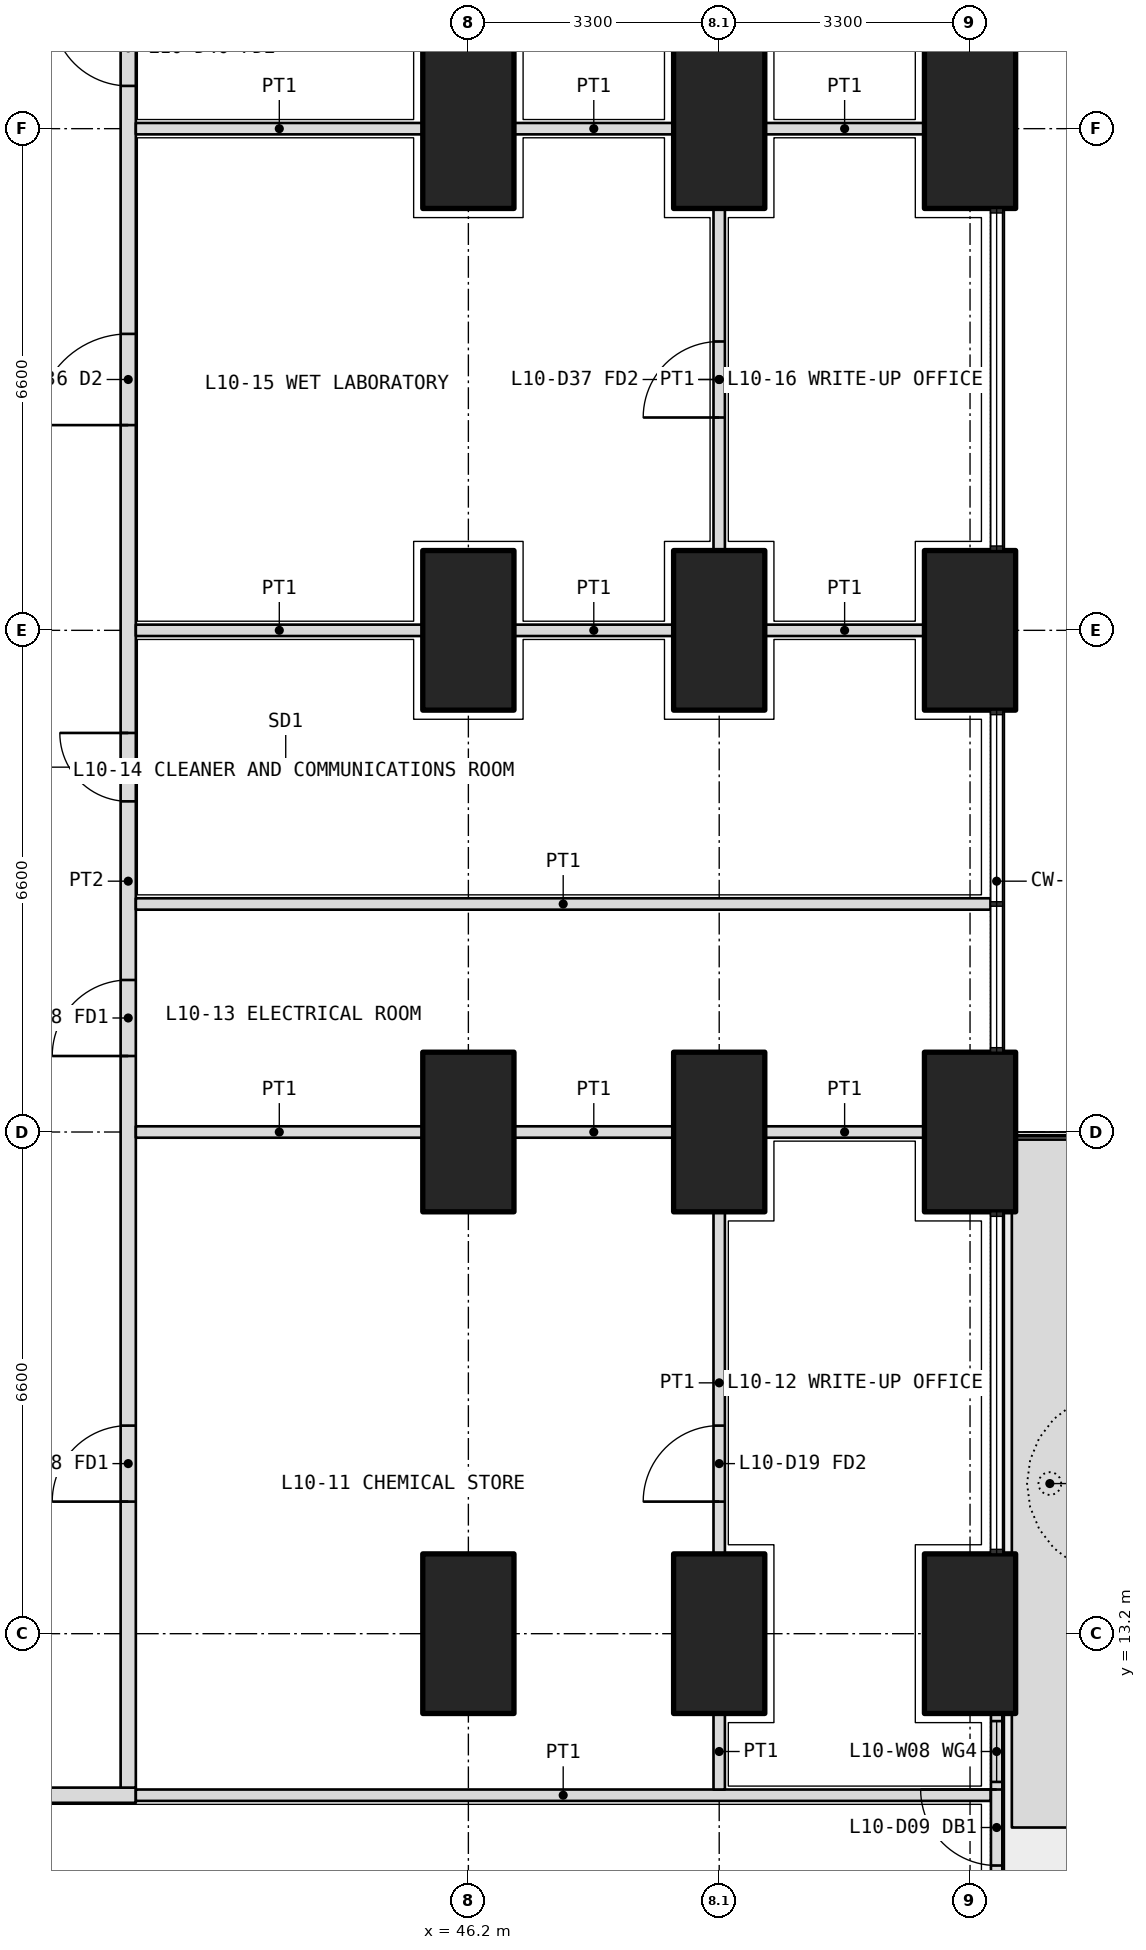
"""IFC4 building model, lengths in metres.
Left out: names, types, materials, properties, quantities, classifications, styles, units other than length and angle.
Written with IfcOpenShell. Run it as: python <this file> out.ifc"""

import sys

from ifc_helpers import new_model, si_unit, direction, frame, frame_2d, origin, origin_2d, place, context, subcontext, project, spatial, polyline, rectangle, outline, extrude, element, fill, save


model = new_model("IFC4")
c1 = context("Model", 3, precision=1e-05, world=origin(), true_north=direction((0.0, 1.0)))
c2 = subcontext(c1, "Body", "Model", "MODEL_VIEW")
j1 = project(units=[si_unit("LENGTHUNIT", "METRE"), si_unit("PLANEANGLEUNIT", "RADIAN")], contexts=[c1])
p1 = place(None, origin())
s1 = spatial("IfcSite", under=j1, at=p1, CompositionType="ELEMENT")
p2 = place(p1, origin())
s2 = spatial("IfcBuilding", under=s1, at=p2, CompositionType="ELEMENT")
p3 = place(p2, frame((0.0, 0.0, 46.5)))
s3 = spatial("IfcBuildingStorey", under=s2, at=p3, CompositionType="ELEMENT", Elevation=46.5)
for number, where, z_axis, x_axis in (
    (1, (52.8, 13.2, 0.0), (0.0, 0.0, 1.0), (0.0, 1.0, 0.0)),
    (2, (52.8, 19.8, 0.0), (0.0, 0.0, 1.0), (0.0, 1.0, 0.0)),
    (3, (52.8, 26.4, 0.0), (0.0, 0.0, 1.0), (0.0, 1.0, 0.0)),
    (4, (52.8, 33.0, 0.0), (0.0, 0.0, 1.0), (0.0, 1.0, 0.0)),
    (5, (49.5, 13.2, 0.0), (0.0, 0.0, 1.0), (0.0, 1.0, 0.0)),
    (6, (49.5, 19.8, 0.0), (0.0, 0.0, 1.0), (0.0, 1.0, 0.0)),
    (7, (49.5, 26.4, 0.0), (0.0, 0.0, 1.0), (0.0, 1.0, 0.0)),
    (8, (49.5, 33.0, 0.0), (0.0, 0.0, 1.0), (0.0, 1.0, 0.0)),
    (9, (46.2, 13.2, 0.0), (0.0, 0.0, 1.0), (0.0, 1.0, 0.0)),
    (10, (46.2, 19.8, 0.0), (0.0, 0.0, 1.0), (0.0, 1.0, 0.0)),
    (11, (46.2, 26.4, 0.0), (0.0, 0.0, 1.0), (0.0, 1.0, 0.0)),
    (12, (46.2, 33.0, 0.0), (0.0, 0.0, 1.0), (0.0, 1.0, 0.0)),
):
    element("IfcColumn", number, at=place(p3, frame(where, z_axis=z_axis, x_axis=x_axis)), inside=s3, PredefinedType="COLUMN", context=c2, shape_type="SweptSolid", body=[
        extrude(rectangle(XDim=2.1, YDim=1.2, at=origin_2d()), origin(), (0.0, 0.0, 1.0), 4.2),
    ])
p4 = place(p3, origin())
e13 = element("IfcWall", 13, at=p4, inside=s3, PredefinedType="USERDEFINED", context=c2, shape_type="SweptSolid", body=[
    extrude(outline(polyline([(53.35, 10.65), (54.35, 10.65), (54.35, 19.7), (53.35, 19.7), (53.35, 10.65)]), holes=[polyline([(53.5, 10.8), (54.2, 10.8), (54.2, 19.55), (53.5, 19.55), (53.5, 10.8)])]), origin(), (0.0, 0.0, 1.0), 1.05),
])
p5 = place(p3, frame((53.15, 7.65, 0.0), z_axis=(0.0, 0.0, 1.0), x_axis=(0.0, 1.0, 0.0)))
e14 = element("IfcWall", 14, at=p5, inside=s3, PredefinedType="SOLIDWALL", context=c2, shape_type="SweptSolid", body=[
    extrude(rectangle(XDim=4.5, YDim=0.15, at=frame_2d((2.25, 0.0))), origin(), (0.0, 0.0, 1.0), 2.7),
])
p6 = place(p5, frame((2.5, 0.0, 0.0)))
e15 = element("IfcOpeningElement", 15, at=p6, cuts=e14, PredefinedType="OPENING", context=c2, shape_type="SweptSolid", body=[
    extrude(rectangle(XDim=1.0, YDim=2.4, at=frame_2d((0.5, 1.2))), frame((0.0, 0.085, 0.0), z_axis=(0.0, -1.0, 0.0), x_axis=(1.0, 0.0, 0.0)), (0.0, 0.0, 1.0), 0.17),
])
p7 = place(p5, frame((0.1, 0.0, 0.1)))
e16 = element("IfcOpeningElement", 16, at=p7, cuts=e14, PredefinedType="OPENING", context=c2, shape_type="SweptSolid", body=[
    extrude(rectangle(XDim=1.9, YDim=2.3, at=frame_2d((0.95, 1.15))), frame((0.0, 0.085, 0.0), z_axis=(0.0, -1.0, 0.0), x_axis=(1.0, 0.0, 0.0)), (0.0, 0.0, 1.0), 0.17),
])
p8 = place(p5, frame((3.6, 0.0, 0.1)))
e17 = element("IfcOpeningElement", 17, at=p8, cuts=e14, PredefinedType="OPENING", context=c2, shape_type="SweptSolid", body=[
    extrude(rectangle(XDim=0.8, YDim=2.3, at=frame_2d((0.4, 1.15))), frame((0.0, 0.085, 0.0), z_axis=(0.0, -1.0, 0.0), x_axis=(1.0, 0.0, 0.0)), (0.0, 0.0, 1.0), 0.17),
])
p9 = place(p3, frame((10.975, 11.075, 0.0), z_axis=(0.0, 0.0, 1.0), x_axis=(1.0, 0.0, 0.0)))
e18 = element("IfcWall", 18, at=p9, inside=s3, PredefinedType="PARTITIONING", context=c2, shape_type="SweptSolid", body=[
    extrude(rectangle(XDim=30.85, YDim=0.2, at=frame_2d((15.425, 0.0))), origin(), (0.0, 0.0, 1.0), 2.85),
])
p10 = place(p9, frame((2.312, 0.0, 0.0)))
e19 = element("IfcOpeningElement", 19, at=p10, cuts=e18, PredefinedType="OPENING", context=c2, shape_type="SweptSolid", body=[
    extrude(rectangle(XDim=1.0, YDim=2.1, at=frame_2d((0.5, 1.05))), frame((0.0, 0.11, 0.0), z_axis=(0.0, -1.0, 0.0), x_axis=(1.0, 0.0, 0.0)), (0.0, 0.0, 1.0), 0.22),
])
p11 = place(p9, frame((6.575, 0.0, 0.0)))
e20 = element("IfcOpeningElement", 20, at=p11, cuts=e18, PredefinedType="OPENING", context=c2, shape_type="SweptSolid", body=[
    extrude(rectangle(XDim=1.2, YDim=2.1, at=frame_2d((0.6, 1.05))), frame((0.0, 0.11, 0.0), z_axis=(0.0, -1.0, 0.0), x_axis=(1.0, 0.0, 0.0)), (0.0, 0.0, 1.0), 0.22),
])
p12 = place(p9, frame((13.275, 0.0, 0.0)))
e21 = element("IfcOpeningElement", 21, at=p12, cuts=e18, PredefinedType="OPENING", context=c2, shape_type="SweptSolid", body=[
    extrude(rectangle(XDim=1.0, YDim=2.1, at=frame_2d((0.5, 1.05))), frame((0.0, 0.11, 0.0), z_axis=(0.0, -1.0, 0.0), x_axis=(1.0, 0.0, 0.0)), (0.0, 0.0, 1.0), 0.22),
])
p13 = place(p9, frame((19.975, 0.0, 0.0)))
e22 = element("IfcOpeningElement", 22, at=p13, cuts=e18, PredefinedType="OPENING", context=c2, shape_type="SweptSolid", body=[
    extrude(rectangle(XDim=1.0, YDim=2.1, at=frame_2d((0.5, 1.05))), frame((0.0, 0.11, 0.0), z_axis=(0.0, -1.0, 0.0), x_axis=(1.0, 0.0, 0.0)), (0.0, 0.0, 1.0), 0.22),
])
p14 = place(p9, frame((23.275, 0.0, 0.0)))
e23 = element("IfcOpeningElement", 23, at=p14, cuts=e18, PredefinedType="OPENING", context=c2, shape_type="SweptSolid", body=[
    extrude(rectangle(XDim=1.0, YDim=2.1, at=frame_2d((0.5, 1.05))), frame((0.0, 0.11, 0.0), z_axis=(0.0, -1.0, 0.0), x_axis=(1.0, 0.0, 0.0)), (0.0, 0.0, 1.0), 0.22),
])
p15 = place(p9, frame((27.438, 0.0, 0.0)))
e24 = element("IfcOpeningElement", 24, at=p15, cuts=e18, PredefinedType="OPENING", context=c2, shape_type="SweptSolid", body=[
    extrude(rectangle(XDim=1.2, YDim=2.1, at=frame_2d((0.6, 1.05))), frame((0.0, 0.11, 0.0), z_axis=(0.0, -1.0, 0.0), x_axis=(1.0, 0.0, 0.0)), (0.0, 0.0, 1.0), 0.22),
])
p16 = place(p3, frame((41.725, 11.175, 0.0), z_axis=(0.0, 0.0, 1.0), x_axis=(0.0, 1.0, 0.0)))
e25 = element("IfcWall", 25, at=p16, inside=s3, PredefinedType="PARTITIONING", context=c2, shape_type="SweptSolid", body=[
    extrude(rectangle(XDim=23.85, YDim=0.2, at=frame_2d((11.925, 0.0))), origin(), (0.0, 0.0, 1.0), 2.85),
])
p17 = place(p16, frame((3.762, 0.0, 0.0)))
e26 = element("IfcOpeningElement", 26, at=p17, cuts=e25, PredefinedType="OPENING", context=c2, shape_type="SweptSolid", body=[
    extrude(rectangle(XDim=1.0, YDim=2.1, at=frame_2d((0.5, 1.05))), frame((0.0, 0.11, 0.0), z_axis=(0.0, -1.0, 0.0), x_axis=(1.0, 0.0, 0.0)), (0.0, 0.0, 1.0), 0.22),
])
p18 = place(p16, frame((9.625, 0.0, 0.0)))
e27 = element("IfcOpeningElement", 27, at=p18, cuts=e25, PredefinedType="OPENING", context=c2, shape_type="SweptSolid", body=[
    extrude(rectangle(XDim=1.0, YDim=2.1, at=frame_2d((0.5, 1.05))), frame((0.0, 0.11, 0.0), z_axis=(0.0, -1.0, 0.0), x_axis=(1.0, 0.0, 0.0)), (0.0, 0.0, 1.0), 0.22),
])
p19 = place(p16, frame((12.975, 0.0, 0.0)))
e28 = element("IfcOpeningElement", 28, at=p19, cuts=e25, PredefinedType="OPENING", context=c2, shape_type="SweptSolid", body=[
    extrude(rectangle(XDim=0.9, YDim=2.1, at=frame_2d((0.45, 1.05))), frame((0.0, 0.11, 0.0), z_axis=(0.0, -1.0, 0.0), x_axis=(1.0, 0.0, 0.0)), (0.0, 0.0, 1.0), 0.22),
])
p20 = place(p16, frame((17.925, 0.0, 0.0)))
e29 = element("IfcOpeningElement", 29, at=p20, cuts=e25, PredefinedType="OPENING", context=c2, shape_type="SweptSolid", body=[
    extrude(rectangle(XDim=1.2, YDim=2.1, at=frame_2d((0.6, 1.05))), frame((0.0, 0.11, 0.0), z_axis=(0.0, -1.0, 0.0), x_axis=(1.0, 0.0, 0.0)), (0.0, 0.0, 1.0), 0.22),
])
p21 = place(p16, frame((22.387, 0.0, 0.0)))
e30 = element("IfcOpeningElement", 30, at=p21, cuts=e25, PredefinedType="OPENING", context=c2, shape_type="SweptSolid", body=[
    extrude(rectangle(XDim=1.0, YDim=2.1, at=frame_2d((0.5, 1.05))), frame((0.0, 0.11, 0.0), z_axis=(0.0, -1.0, 0.0), x_axis=(1.0, 0.0, 0.0)), (0.0, 0.0, 1.0), 0.22),
])
p22 = place(p3, frame((53.07, 11.075, 0.0), z_axis=(0.0, 0.0, 1.0), x_axis=(-1.0, 0.0, 0.0)))
e31 = element("IfcWall", 31, at=p22, inside=s3, PredefinedType="PARTITIONING", context=c2, shape_type="SweptSolid", body=[
    extrude(rectangle(XDim=11.245, YDim=0.15, at=frame_2d((5.623, 0.0))), origin(), (0.0, 0.0, 1.0), 2.7),
])
p23 = place(p3, frame((49.5, 11.15, 0.0), z_axis=(0.0, 0.0, 1.0), x_axis=(0.0, 1.0, 0.0)))
e32 = element("IfcWall", 32, at=p23, inside=s3, PredefinedType="PARTITIONING", context=c2, shape_type="SweptSolid", body=[
    extrude(rectangle(XDim=1.0, YDim=0.15, at=frame_2d((0.5, 0.0))), origin(), (0.0, 0.0, 1.0), 3.9),
])
p24 = place(p3, frame((49.5, 14.25, 0.0), z_axis=(0.0, 0.0, 1.0), x_axis=(0.0, 1.0, 0.0)))
e33 = element("IfcWall", 33, at=p24, inside=s3, PredefinedType="PARTITIONING", context=c2, shape_type="SweptSolid", body=[
    extrude(rectangle(XDim=4.5, YDim=0.15, at=frame_2d((2.25, 0.0))), origin(), (0.0, 0.0, 1.0), 3.9),
])
p25 = place(p24, frame((0.688, 0.0, 0.0)))
e34 = element("IfcOpeningElement", 34, at=p25, cuts=e33, PredefinedType="OPENING", context=c2, shape_type="SweptSolid", body=[
    extrude(rectangle(XDim=1.0, YDim=2.1, at=frame_2d((0.5, 1.05))), frame((0.0, 0.085, 0.0), z_axis=(0.0, -1.0, 0.0), x_axis=(1.0, 0.0, 0.0)), (0.0, 0.0, 1.0), 0.17),
])
p26 = place(p3, frame((49.5, 27.45, 0.0), z_axis=(0.0, 0.0, 1.0), x_axis=(0.0, 1.0, 0.0)))
e35 = element("IfcWall", 35, at=p26, inside=s3, PredefinedType="PARTITIONING", context=c2, shape_type="SweptSolid", body=[
    extrude(rectangle(XDim=4.5, YDim=0.15, at=frame_2d((2.25, 0.0))), origin(), (0.0, 0.0, 1.0), 3.9),
])
p27 = place(p26, frame((1.75, 0.0, 0.0)))
e36 = element("IfcOpeningElement", 36, at=p27, cuts=e35, PredefinedType="OPENING", context=c2, shape_type="SweptSolid", body=[
    extrude(rectangle(XDim=1.0, YDim=2.1, at=frame_2d((0.5, 1.05))), frame((0.0, 0.085, 0.0), z_axis=(0.0, -1.0, 0.0), x_axis=(1.0, 0.0, 0.0)), (0.0, 0.0, 1.0), 0.17),
])
p28 = place(p3, frame((53.07, 22.8, 0.0), z_axis=(0.0, 0.0, 1.0), x_axis=(-1.0, 0.0, 0.0)))
e37 = element("IfcWall", 37, at=p28, inside=s3, PredefinedType="PARTITIONING", context=c2, shape_type="SweptSolid", body=[
    extrude(rectangle(XDim=11.245, YDim=0.15, at=frame_2d((5.623, 0.0))), origin(), (0.0, 0.0, 1.0), 2.7),
])
for number, where, z_axis, x_axis in (
    (38, (52.2, 26.4, 0.0), (0.0, 0.0, 1.0), (-1.0, 0.0, 0.0)),
    (39, (48.9, 26.4, 0.0), (0.0, 0.0, 1.0), (-1.0, 0.0, 0.0)),
):
    element("IfcWall", number, at=place(p3, frame(where, z_axis=z_axis, x_axis=x_axis)), inside=s3, PredefinedType="PARTITIONING", context=c2, shape_type="SweptSolid", body=[
        extrude(rectangle(XDim=2.1, YDim=0.15, at=frame_2d((1.05, 0.0))), origin(), (0.0, 0.0, 1.0), 2.85),
    ])
p29 = place(p3, frame((45.6, 26.4, 0.0), z_axis=(0.0, 0.0, 1.0), x_axis=(-1.0, 0.0, 0.0)))
e40 = element("IfcWall", 40, at=p29, inside=s3, PredefinedType="PARTITIONING", context=c2, shape_type="SweptSolid", body=[
    extrude(rectangle(XDim=3.775, YDim=0.15, at=frame_2d((1.888, 0.0))), origin(), (0.0, 0.0, 1.0), 2.85),
])
for number, where, z_axis, x_axis in (
    (41, (52.2, 19.8, 0.0), (0.0, 0.0, 1.0), (-1.0, 0.0, 0.0)),
    (42, (48.9, 19.8, 0.0), (0.0, 0.0, 1.0), (-1.0, 0.0, 0.0)),
):
    element("IfcWall", number, at=place(p3, frame(where, z_axis=z_axis, x_axis=x_axis)), inside=s3, PredefinedType="PARTITIONING", context=c2, shape_type="SweptSolid", body=[
        extrude(rectangle(XDim=2.1, YDim=0.15, at=frame_2d((1.05, 0.0))), origin(), (0.0, 0.0, 1.0), 2.85),
    ])
p30 = place(p3, frame((45.6, 19.8, 0.0), z_axis=(0.0, 0.0, 1.0), x_axis=(-1.0, 0.0, 0.0)))
e43 = element("IfcWall", 43, at=p30, inside=s3, PredefinedType="PARTITIONING", context=c2, shape_type="SweptSolid", body=[
    extrude(rectangle(XDim=3.775, YDim=0.15, at=frame_2d((1.888, 0.0))), origin(), (0.0, 0.0, 1.0), 2.85),
])
for number, where, z_axis, x_axis in (
    (44, (52.2, 33.0, 0.0), (0.0, 0.0, 1.0), (-1.0, 0.0, 0.0)),
    (45, (48.9, 33.0, 0.0), (0.0, 0.0, 1.0), (-1.0, 0.0, 0.0)),
):
    element("IfcWall", number, at=place(p3, frame(where, z_axis=z_axis, x_axis=x_axis)), inside=s3, PredefinedType="PARTITIONING", context=c2, shape_type="SweptSolid", body=[
        extrude(rectangle(XDim=2.1, YDim=0.15, at=frame_2d((1.05, 0.0))), origin(), (0.0, 0.0, 1.0), 2.85),
    ])
p31 = place(p3, frame((45.6, 33.0, 0.0), z_axis=(0.0, 0.0, 1.0), x_axis=(-1.0, 0.0, 0.0)))
e46 = element("IfcWall", 46, at=p31, inside=s3, PredefinedType="PARTITIONING", context=c2, shape_type="SweptSolid", body=[
    extrude(rectangle(XDim=3.775, YDim=0.15, at=frame_2d((1.888, 0.0))), origin(), (0.0, 0.0, 1.0), 2.85),
])
p32 = place(p6, origin())
e47 = element("IfcDoor", 47, at=p32, inside=s3, OperationType="SINGLE_SWING_RIGHT", PredefinedType="DOOR", context=c2, shape_type="SweptSolid", body=[
    extrude(rectangle(XDim=1.0, YDim=2.4, at=frame_2d((0.5, 1.2))), frame((0.0, 0.025, 0.0), z_axis=(0.0, -1.0, 0.0), x_axis=(1.0, 0.0, 0.0)), (0.0, 0.0, 1.0), 0.05),
])
fill(e15, e47)
p33 = place(p8, origin())
e48 = element("IfcWindow", 48, at=p33, inside=s3, PartitioningType="SINGLE_PANEL", PredefinedType="WINDOW", context=c2, shape_type="SweptSolid", body=[
    extrude(rectangle(XDim=0.8, YDim=2.3, at=frame_2d((0.4, 1.15))), frame((0.0, 0.03, 0.0), z_axis=(0.0, -1.0, 0.0), x_axis=(1.0, 0.0, 0.0)), (0.0, 0.0, 1.0), 0.06),
])
fill(e17, e48)
p34 = place(p17, origin())
e49 = element("IfcDoor", 49, at=p34, inside=s3, OperationType="SINGLE_SWING_LEFT", PredefinedType="DOOR", context=c2, shape_type="SweptSolid", body=[
    extrude(rectangle(XDim=1.0, YDim=2.1, at=frame_2d((0.5, 1.05))), frame((0.0, 0.025, 0.0), z_axis=(0.0, -1.0, 0.0), x_axis=(1.0, 0.0, 0.0)), (0.0, 0.0, 1.0), 0.05),
])
fill(e26, e49)
p35 = place(p25, origin())
e50 = element("IfcDoor", 50, at=p35, inside=s3, OperationType="SINGLE_SWING_LEFT", PredefinedType="DOOR", context=c2, shape_type="SweptSolid", body=[
    extrude(rectangle(XDim=1.0, YDim=2.1, at=frame_2d((0.5, 1.05))), frame((0.0, 0.025, 0.0), z_axis=(0.0, -1.0, 0.0), x_axis=(1.0, 0.0, 0.0)), (0.0, 0.0, 1.0), 0.05),
])
fill(e34, e50)
p36 = place(p18, origin())
e51 = element("IfcDoor", 51, at=p36, inside=s3, OperationType="SINGLE_SWING_LEFT", PredefinedType="DOOR", context=c2, shape_type="SweptSolid", body=[
    extrude(rectangle(XDim=1.0, YDim=2.1, at=frame_2d((0.5, 1.05))), frame((0.0, 0.025, 0.0), z_axis=(0.0, -1.0, 0.0), x_axis=(1.0, 0.0, 0.0)), (0.0, 0.0, 1.0), 0.05),
])
fill(e27, e51)
p37 = place(p19, origin())
e52 = element("IfcDoor", 52, at=p37, inside=s3, OperationType="SINGLE_SWING_RIGHT", PredefinedType="DOOR", context=c2, shape_type="SweptSolid", body=[
    extrude(rectangle(XDim=0.9, YDim=2.1, at=frame_2d((0.45, 1.05))), frame((0.0, 0.025, 0.0), z_axis=(0.0, -1.0, 0.0), x_axis=(1.0, 0.0, 0.0)), (0.0, 0.0, 1.0), 0.05),
])
fill(e28, e52)
p38 = place(p20, origin())
e53 = element("IfcDoor", 53, at=p38, inside=s3, OperationType="DOUBLE_DOOR_SINGLE_SWING", PredefinedType="DOOR", context=c2, shape_type="SweptSolid", body=[
    extrude(rectangle(XDim=1.2, YDim=2.1, at=frame_2d((0.6, 1.05))), frame((0.0, 0.025, 0.0), z_axis=(0.0, -1.0, 0.0), x_axis=(1.0, 0.0, 0.0)), (0.0, 0.0, 1.0), 0.05),
])
fill(e29, e53)
p39 = place(p27, origin())
e54 = element("IfcDoor", 54, at=p39, inside=s3, OperationType="SINGLE_SWING_LEFT", PredefinedType="DOOR", context=c2, shape_type="SweptSolid", body=[
    extrude(rectangle(XDim=1.0, YDim=2.1, at=frame_2d((0.5, 1.05))), frame((0.0, 0.025, 0.0), z_axis=(0.0, -1.0, 0.0), x_axis=(1.0, 0.0, 0.0)), (0.0, 0.0, 1.0), 0.05),
])
fill(e36, e54)
p40 = place(p21, origin())
e55 = element("IfcDoor", 55, at=p40, inside=s3, OperationType="SINGLE_SWING_RIGHT", PredefinedType="DOOR", context=c2, shape_type="SweptSolid", body=[
    extrude(rectangle(XDim=1.0, YDim=2.1, at=frame_2d((0.5, 1.05))), frame((0.0, 0.025, 0.0), z_axis=(0.0, -1.0, 0.0), x_axis=(1.0, 0.0, 0.0)), (0.0, 0.0, 1.0), 0.05),
])
fill(e30, e55)
save(model, sys.argv[1])
